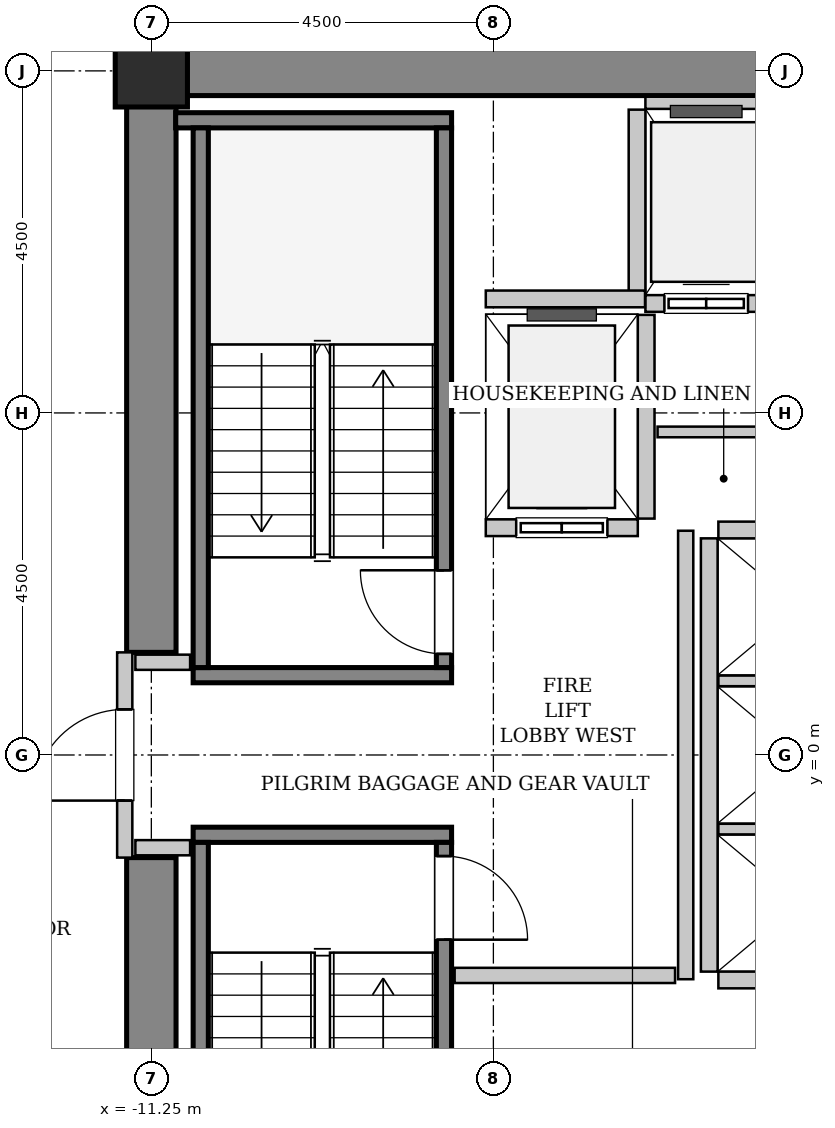
"""IFC4 building model, lengths in metres.
Left out: names, types, materials, properties, quantities, classifications, styles, units other than length and angle.
Written with IfcOpenShell. Run it as: python <this file> out.ifc"""

import sys

from ifc_helpers import new_model, si_unit, direction, frame, frame_2d, origin, origin_2d, place, context, subcontext, project, spatial, rectangle, hollow_rectangle, extrude, source, transform, mapped, element, fill, save


model = new_model("IFC4")
c1 = context("Model", 3, precision=1e-05, world=origin(), true_north=direction((0.0, 1.0)))
c2 = subcontext(c1, "Body", "Model", "MODEL_VIEW")
j1 = project(units=[si_unit("LENGTHUNIT", "METRE"), si_unit("PLANEANGLEUNIT", "RADIAN")], contexts=[c1])
p1 = place(None, origin())
s1 = spatial("IfcSite", under=j1, at=p1, CompositionType="ELEMENT")
p2 = place(p1, origin())
s2 = spatial("IfcBuilding", under=s1, at=p2, CompositionType="ELEMENT")
p3 = place(p2, frame((0.0, 0.0, 33.0)))
s3 = spatial("IfcBuildingStorey", under=s2, at=p3, CompositionType="ELEMENT", Elevation=33.0)
m1 = source(origin(), c2, "Body", "SweptSolid", [
    extrude(rectangle(XDim=10.025, YDim=0.65, at=frame_2d((5.012, 0.0))), origin(), (0.0, 0.0, 1.0), 3.8),
])
p4 = place(p3, frame((-11.575, 9.0, 0.0), z_axis=(0.0, 0.0, 1.0), x_axis=(1.0, 0.0, 0.0)))
e1 = element("IfcWall", 1, at=p4, inside=s3, PredefinedType="SHEAR", context=c2, shape_type="MappedRepresentation", body=[
    mapped(m1, transform((0.0, 0.0, 0.0), x_axis=(1.0, 0.0, 0.0), y_axis=(0.0, 1.0, 0.0), z_axis=(0.0, 0.0, 1.0), scale=1.0)),
])
m2 = source(origin(), c2, "Body", "SweptSolid", [
    extrude(rectangle(XDim=7.325, YDim=0.65, at=frame_2d((3.663, 0.0))), origin(), (0.0, 0.0, 1.0), 3.8),
])
for number, where, z_axis, x_axis in (
    (2, (-11.25, -8.675, 0.0), (0.0, 0.0, 1.0), (0.0, 1.0, 0.0)),
    (3, (-11.25, 1.35, 0.0), (0.0, 0.0, 1.0), (0.0, 1.0, 0.0)),
):
    element("IfcWall", number, at=place(p3, frame(where, z_axis=z_axis, x_axis=x_axis)), inside=s3, PredefinedType="SHEAR", context=c2, shape_type="MappedRepresentation", body=[
        mapped(m2, transform((0.0, 0.0, 0.0), x_axis=(1.0, 0.0, 0.0), y_axis=(0.0, 1.0, 0.0), z_axis=(0.0, 0.0, 1.0), scale=1.0)),
    ])
m3 = source(origin(), c2, "Body", "SweptSolid", [
    extrude(hollow_rectangle(XDim=0.95, YDim=0.95, WallThickness=0.045, InnerFilletRadius=0.045, OuterFilletRadius=0.09, at=origin_2d()), origin(), (0.0, 0.0, 1.0), 3.8),
])
p5 = place(p3, frame((-11.25, 9.0, 0.0), z_axis=(0.0, 0.0, 1.0), x_axis=(1.0, 0.0, 0.0)))
e4 = element("IfcColumn", 4, at=p5, inside=s3, PredefinedType="COLUMN", context=c2, shape_type="MappedRepresentation", body=[
    mapped(m3, transform((0.0, 0.0, 0.0), x_axis=(1.0, 0.0, 0.0), y_axis=(0.0, 1.0, 0.0), z_axis=(0.0, 0.0, 1.0), scale=1.0)),
])
m4 = source(origin(), c2, "Body", "SweptSolid", [
    extrude(rectangle(XDim=3.4, YDim=0.2, at=frame_2d((1.7, 0.0))), origin(), (0.0, 0.0, 1.0), 3.8),
])
p6 = place(p3, frame((-7.3, 1.05, 0.0), z_axis=(0.0, 0.0, 1.0), x_axis=(-1.0, 0.0, 0.0)))
e5 = element("IfcWall", 5, at=p6, inside=s3, PredefinedType="SOLIDWALL", context=c2, shape_type="MappedRepresentation", body=[
    mapped(m4, transform((0.0, 0.0, 0.0), x_axis=(1.0, 0.0, 0.0), y_axis=(0.0, 1.0, 0.0), z_axis=(0.0, 0.0, 1.0), scale=1.0)),
])
m5 = source(origin(), c2, "Body", "SweptSolid", [
    extrude(rectangle(XDim=3.63, YDim=0.2, at=frame_2d((1.815, 0.0))), origin(), (0.0, 0.0, 1.0), 3.8),
])
p7 = place(p3, frame((-7.3, 8.35, 0.0), z_axis=(0.0, 0.0, 1.0), x_axis=(-1.0, 0.0, 0.0)))
e6 = element("IfcWall", 6, at=p7, inside=s3, PredefinedType="SOLIDWALL", context=c2, shape_type="MappedRepresentation", body=[
    mapped(m5, transform((0.0, 0.0, 0.0), x_axis=(1.0, 0.0, 0.0), y_axis=(0.0, 1.0, 0.0), z_axis=(0.0, 0.0, 1.0), scale=1.0)),
])
m6 = source(origin(), c2, "Body", "SweptSolid", [
    extrude(rectangle(XDim=7.1, YDim=0.2, at=frame_2d((3.55, 0.0))), origin(), (0.0, 0.0, 1.0), 3.8),
])
p8 = place(p3, frame((-7.4, 1.15, 0.0), z_axis=(0.0, 0.0, 1.0), x_axis=(0.0, 1.0, 0.0)))
e7 = element("IfcWall", 7, at=p8, inside=s3, PredefinedType="SOLIDWALL", context=c2, shape_type="MappedRepresentation", body=[
    mapped(m6, transform((0.0, 0.0, 0.0), x_axis=(1.0, 0.0, 0.0), y_axis=(0.0, 1.0, 0.0), z_axis=(0.0, 0.0, 1.0), scale=1.0)),
])
p9 = place(p8, frame((0.18, 0.0, 0.0)))
e8 = element("IfcOpeningElement", 8, at=p9, cuts=e7, PredefinedType="OPENING", context=c2, shape_type="SweptSolid", body=[
    extrude(rectangle(XDim=1.1, YDim=2.15, at=frame_2d((0.55, 1.075))), frame((0.0, 0.11, 0.0), z_axis=(0.0, -1.0, 0.0), x_axis=(1.0, 0.0, 0.0)), (0.0, 0.0, 1.0), 0.22),
])
p10 = place(p3, frame((-10.6, 1.15, 0.0), z_axis=(0.0, 0.0, 1.0), x_axis=(0.0, 1.0, 0.0)))
e9 = element("IfcWall", 9, at=p10, inside=s3, PredefinedType="SOLIDWALL", context=c2, shape_type="MappedRepresentation", body=[
    mapped(m6, transform((0.0, 0.0, 0.0), x_axis=(1.0, 0.0, 0.0), y_axis=(0.0, 1.0, 0.0), z_axis=(0.0, 0.0, 1.0), scale=1.0)),
])
p11 = place(p3, frame((-10.7, -1.05, 0.0), z_axis=(0.0, 0.0, 1.0), x_axis=(1.0, 0.0, 0.0)))
e10 = element("IfcWall", 10, at=p11, inside=s3, PredefinedType="SOLIDWALL", context=c2, shape_type="MappedRepresentation", body=[
    mapped(m4, transform((0.0, 0.0, 0.0), x_axis=(1.0, 0.0, 0.0), y_axis=(0.0, 1.0, 0.0), z_axis=(0.0, 0.0, 1.0), scale=1.0)),
])
p12 = place(p3, frame((-10.6, -1.15, 0.0), z_axis=(0.0, 0.0, 1.0), x_axis=(0.0, -1.0, 0.0)))
e11 = element("IfcWall", 11, at=p12, inside=s3, PredefinedType="SOLIDWALL", context=c2, shape_type="MappedRepresentation", body=[
    mapped(m6, transform((0.0, 0.0, 0.0), x_axis=(1.0, 0.0, 0.0), y_axis=(0.0, 1.0, 0.0), z_axis=(0.0, 0.0, 1.0), scale=1.0)),
])
p13 = place(p3, frame((-7.4, -1.15, 0.0), z_axis=(0.0, 0.0, 1.0), x_axis=(0.0, -1.0, 0.0)))
e12 = element("IfcWall", 12, at=p13, inside=s3, PredefinedType="SOLIDWALL", context=c2, shape_type="MappedRepresentation", body=[
    mapped(m6, transform((0.0, 0.0, 0.0), x_axis=(1.0, 0.0, 0.0), y_axis=(0.0, 1.0, 0.0), z_axis=(0.0, 0.0, 1.0), scale=1.0)),
])
p14 = place(p13, frame((0.18, 0.0, 0.0)))
e13 = element("IfcOpeningElement", 13, at=p14, cuts=e12, PredefinedType="OPENING", context=c2, shape_type="SweptSolid", body=[
    extrude(rectangle(XDim=1.1, YDim=2.15, at=frame_2d((0.55, 1.075))), frame((0.0, 0.11, 0.0), z_axis=(0.0, -1.0, 0.0), x_axis=(1.0, 0.0, 0.0)), (0.0, 0.0, 1.0), 0.22),
])
m7 = source(origin(), c2, "Body", "SweptSolid", [
    extrude(rectangle(XDim=2.0, YDim=0.22, at=frame_2d((1.0, 0.0))), origin(), (0.0, 0.0, 1.0), 3.535),
])
p15 = place(p3, frame((-6.85, 2.99, 0.0), z_axis=(0.0, 0.0, 1.0), x_axis=(1.0, 0.0, 0.0)))
e14 = element("IfcWall", 14, at=p15, inside=s3, PredefinedType="SOLIDWALL", context=c2, shape_type="MappedRepresentation", body=[
    mapped(m7, transform((0.0, 0.0, 0.0), x_axis=(1.0, 0.0, 0.0), y_axis=(0.0, 1.0, 0.0), z_axis=(0.0, 0.0, 1.0), scale=1.0)),
])
p16 = place(p15, frame((0.4, 0.0, 0.0)))
e15 = element("IfcOpeningElement", 15, at=p16, cuts=e14, PredefinedType="OPENING", context=c2, shape_type="SweptSolid", body=[
    extrude(rectangle(XDim=1.2, YDim=2.2, at=frame_2d((0.6, 1.1))), frame((0.0, 0.12, 0.0), z_axis=(0.0, -1.0, 0.0), x_axis=(1.0, 0.0, 0.0)), (0.0, 0.0, 1.0), 0.24),
])
m8 = source(origin(), c2, "Body", "SweptSolid", [
    extrude(rectangle(XDim=2.68, YDim=0.22, at=frame_2d((1.34, 0.0))), origin(), (0.0, 0.0, 1.0), 3.535),
])
p17 = place(p3, frame((-4.74, 3.11, 0.0), z_axis=(0.0, 0.0, 1.0), x_axis=(0.0, 1.0, 0.0)))
e16 = element("IfcWall", 16, at=p17, inside=s3, PredefinedType="SOLIDWALL", context=c2, shape_type="MappedRepresentation", body=[
    mapped(m8, transform((0.0, 0.0, 0.0), x_axis=(1.0, 0.0, 0.0), y_axis=(0.0, 1.0, 0.0), z_axis=(0.0, 0.0, 1.0), scale=1.0)),
])
m9 = source(origin(), c2, "Body", "SweptSolid", [
    extrude(rectangle(XDim=3.2, YDim=0.22, at=frame_2d((1.6, 0.0))), origin(), (0.0, 0.0, 1.0), 3.535),
])
p18 = place(p3, frame((-4.75, 5.94, 0.0), z_axis=(0.0, 0.0, 1.0), x_axis=(1.0, 0.0, 0.0)))
e17 = element("IfcWall", 17, at=p18, inside=s3, PredefinedType="SOLIDWALL", context=c2, shape_type="MappedRepresentation", body=[
    mapped(m9, transform((0.0, 0.0, 0.0), x_axis=(1.0, 0.0, 0.0), y_axis=(0.0, 1.0, 0.0), z_axis=(0.0, 0.0, 1.0), scale=1.0)),
])
p19 = place(p18, frame((0.25, 0.0, 0.0)))
e18 = element("IfcOpeningElement", 18, at=p19, cuts=e17, PredefinedType="OPENING", context=c2, shape_type="SweptSolid", body=[
    extrude(rectangle(XDim=1.1, YDim=2.2, at=frame_2d((0.55, 1.1))), frame((0.0, 0.12, 0.0), z_axis=(0.0, -1.0, 0.0), x_axis=(1.0, 0.0, 0.0)), (0.0, 0.0, 1.0), 0.24),
])
p20 = place(p18, frame((1.875, 0.0, 0.0)))
e19 = element("IfcOpeningElement", 19, at=p20, cuts=e17, PredefinedType="OPENING", context=c2, shape_type="SweptSolid", body=[
    extrude(rectangle(XDim=1.1, YDim=2.2, at=frame_2d((0.55, 1.1))), frame((0.0, 0.12, 0.0), z_axis=(0.0, -1.0, 0.0), x_axis=(1.0, 0.0, 0.0)), (0.0, 0.0, 1.0), 0.24),
])
m10 = source(origin(), c2, "Body", "SweptSolid", [
    extrude(rectangle(XDim=3.2, YDim=0.16, at=frame_2d((1.6, 0.0))), origin(), (0.0, 0.0, 1.0), 2.425),
])
p21 = place(p3, frame((-1.55, 8.58, 0.0), z_axis=(0.0, 0.0, 1.0), x_axis=(-1.0, 0.0, 0.0)))
e20 = element("IfcWall", 20, at=p21, inside=s3, PredefinedType="PARTITIONING", context=c2, shape_type="MappedRepresentation", body=[
    mapped(m10, transform((0.0, 0.0, 0.0), x_axis=(1.0, 0.0, 0.0), y_axis=(0.0, 1.0, 0.0), z_axis=(0.0, 0.0, 1.0), scale=1.0)),
])
m11 = source(origin(), c2, "Body", "SweptSolid", [
    extrude(rectangle(XDim=2.43, YDim=0.22, at=frame_2d((1.215, 0.0))), origin(), (0.0, 0.0, 1.0), 3.535),
])
p22 = place(p3, frame((-4.86, 8.49, 0.0), z_axis=(0.0, 0.0, 1.0), x_axis=(0.0, -1.0, 0.0)))
e21 = element("IfcWall", 21, at=p22, inside=s3, PredefinedType="SOLIDWALL", context=c2, shape_type="MappedRepresentation", body=[
    mapped(m11, transform((0.0, 0.0, 0.0), x_axis=(1.0, 0.0, 0.0), y_axis=(0.0, 1.0, 0.0), z_axis=(0.0, 0.0, 1.0), scale=1.0)),
])
m12 = source(origin(), c2, "Body", "SweptSolid", [
    extrude(rectangle(XDim=5.7, YDim=0.22, at=frame_2d((2.85, 0.0))), origin(), (0.0, 0.0, 1.0), 3.535),
])
p23 = place(p3, frame((-3.91, 2.85, 0.0), z_axis=(0.0, 0.0, 1.0), x_axis=(0.0, -1.0, 0.0)))
e22 = element("IfcWall", 22, at=p23, inside=s3, PredefinedType="SOLIDWALL", context=c2, shape_type="MappedRepresentation", body=[
    mapped(m12, transform((0.0, 0.0, 0.0), x_axis=(1.0, 0.0, 0.0), y_axis=(0.0, 1.0, 0.0), z_axis=(0.0, 0.0, 1.0), scale=1.0)),
])
m13 = source(origin(), c2, "Body", "SweptSolid", [
    extrude(rectangle(XDim=2.13, YDim=0.22, at=frame_2d((1.065, 0.0))), origin(), (0.0, 0.0, 1.0), 3.535),
])
p24 = place(p3, frame((-3.79, -2.96, 0.0), z_axis=(0.0, 0.0, 1.0), x_axis=(1.0, 0.0, 0.0)))
e23 = element("IfcWall", 23, at=p24, inside=s3, PredefinedType="SOLIDWALL", context=c2, shape_type="MappedRepresentation", body=[
    mapped(m13, transform((0.0, 0.0, 0.0), x_axis=(1.0, 0.0, 0.0), y_axis=(0.0, 1.0, 0.0), z_axis=(0.0, 0.0, 1.0), scale=1.0)),
])
m14 = source(origin(), c2, "Body", "SweptSolid", [
    extrude(rectangle(XDim=2.13, YDim=0.14, at=frame_2d((1.065, 0.0))), origin(), (0.0, 0.0, 1.0), 3.535),
])
for number, where, z_axis, x_axis in (
    (24, (-3.79, -0.975, 0.0), (0.0, 0.0, 1.0), (1.0, 0.0, 0.0)),
    (25, (-3.79, 0.975, 0.0), (0.0, 0.0, 1.0), (1.0, 0.0, 0.0)),
):
    element("IfcWall", number, at=place(p3, frame(where, z_axis=z_axis, x_axis=x_axis)), inside=s3, PredefinedType="PARTITIONING", context=c2, shape_type="MappedRepresentation", body=[
        mapped(m14, transform((0.0, 0.0, 0.0), x_axis=(1.0, 0.0, 0.0), y_axis=(0.0, 1.0, 0.0), z_axis=(0.0, 0.0, 1.0), scale=1.0)),
    ])
p25 = place(p3, frame((-1.66, 2.96, 0.0), z_axis=(0.0, 0.0, 1.0), x_axis=(-1.0, 0.0, 0.0)))
e26 = element("IfcWall", 26, at=p25, inside=s3, PredefinedType="SOLIDWALL", context=c2, shape_type="MappedRepresentation", body=[
    mapped(m13, transform((0.0, 0.0, 0.0), x_axis=(1.0, 0.0, 0.0), y_axis=(0.0, 1.0, 0.0), z_axis=(0.0, 0.0, 1.0), scale=1.0)),
])
m15 = source(origin(), c2, "Body", "SweptSolid", [
    extrude(rectangle(XDim=2.095, YDim=0.22, at=frame_2d((1.048, 0.0))), origin(), (0.0, 0.0, 1.0), 3.535),
])
p26 = place(p3, frame((-6.85, 6.0, 0.0), z_axis=(0.0, 0.0, 1.0), x_axis=(1.0, 0.0, 0.0)))
e27 = element("IfcWall", 27, at=p26, inside=s3, PredefinedType="SOLIDWALL", context=c2, shape_type="MappedRepresentation", body=[
    mapped(m15, transform((0.0, 0.0, 0.0), x_axis=(1.0, 0.0, 0.0), y_axis=(0.0, 1.0, 0.0), z_axis=(0.0, 0.0, 1.0), scale=1.0)),
])
m16 = source(origin(), c2, "Body", "SweptSolid", [
    extrude(rectangle(XDim=2.7, YDim=0.2, at=frame_2d((1.35, 0.0))), origin(), (0.0, 0.0, 1.0), 2.425),
])
p27 = place(p3, frame((-11.6, -1.35, 0.0), z_axis=(0.0, 0.0, 1.0), x_axis=(0.0, 1.0, 0.0)))
e28 = element("IfcWall", 28, at=p27, inside=s3, PredefinedType="PARTITIONING", context=c2, shape_type="MappedRepresentation", body=[
    mapped(m16, transform((0.0, 0.0, 0.0), x_axis=(1.0, 0.0, 0.0), y_axis=(0.0, 1.0, 0.0), z_axis=(0.0, 0.0, 1.0), scale=1.0)),
])
p28 = place(p27, frame((0.75, 0.0, 0.0)))
e29 = element("IfcOpeningElement", 29, at=p28, cuts=e28, PredefinedType="OPENING", context=c2, shape_type="SweptSolid", body=[
    extrude(rectangle(XDim=1.2, YDim=2.15, at=frame_2d((0.6, 1.075))), frame((0.0, 0.11, 0.0), z_axis=(0.0, -1.0, 0.0), x_axis=(1.0, 0.0, 0.0)), (0.0, 0.0, 1.0), 0.22),
])
m17 = source(origin(), c2, "Body", "SweptSolid", [
    extrude(rectangle(XDim=5.9, YDim=0.2, at=frame_2d((2.95, 0.0))), origin(), (0.0, 0.0, 1.0), 3.535),
])
p29 = place(p3, frame((-4.22, -2.95, 0.0), z_axis=(0.0, 0.0, 1.0), x_axis=(0.0, 1.0, 0.0)))
e30 = element("IfcWall", 30, at=p29, inside=s3, PredefinedType="PARTITIONING", context=c2, shape_type="MappedRepresentation", body=[
    mapped(m17, transform((0.0, 0.0, 0.0), x_axis=(1.0, 0.0, 0.0), y_axis=(0.0, 1.0, 0.0), z_axis=(0.0, 0.0, 1.0), scale=1.0)),
])
m18 = source(origin(), c2, "Body", "SweptSolid", [
    extrude(rectangle(XDim=2.9, YDim=0.2, at=frame_2d((1.45, 0.0))), origin(), (0.0, 0.0, 1.0), 3.535),
])
p30 = place(p3, frame((-7.26, -2.9, 0.0), z_axis=(0.0, 0.0, 1.0), x_axis=(1.0, 0.0, 0.0)))
e31 = element("IfcWall", 31, at=p30, inside=s3, PredefinedType="PARTITIONING", context=c2, shape_type="MappedRepresentation", body=[
    mapped(m18, transform((0.0, 0.0, 0.0), x_axis=(1.0, 0.0, 0.0), y_axis=(0.0, 1.0, 0.0), z_axis=(0.0, 0.0, 1.0), scale=1.0)),
])
m19 = source(origin(), c2, "Body", "SweptSolid", [
    extrude(rectangle(XDim=0.72, YDim=0.2, at=frame_2d((0.36, 0.0))), origin(), (0.0, 0.0, 1.0), 3.535),
])
for number, where, z_axis, x_axis in (
    (32, (-11.46, 1.22, 0.0), (0.0, 0.0, 1.0), (1.0, 0.0, 0.0)),
    (33, (-11.46, -1.22, 0.0), (0.0, 0.0, 1.0), (1.0, 0.0, 0.0)),
):
    element("IfcWall", number, at=place(p3, frame(where, z_axis=z_axis, x_axis=x_axis)), inside=s3, PredefinedType="PARTITIONING", context=c2, shape_type="MappedRepresentation", body=[
        mapped(m19, transform((0.0, 0.0, 0.0), x_axis=(1.0, 0.0, 0.0), y_axis=(0.0, 1.0, 0.0), z_axis=(0.0, 0.0, 1.0), scale=1.0)),
    ])
m20 = source(origin(), c2, "Body", "SweptSolid", [
    extrude(rectangle(XDim=2.95, YDim=0.14, at=frame_2d((1.475, 0.0))), origin(), (0.0, 0.0, 1.0), 3.535),
])
p31 = place(p3, frame((-4.59, 4.25, 0.0), z_axis=(0.0, 0.0, 1.0), x_axis=(1.0, 0.0, 0.0)))
e34 = element("IfcWall", 34, at=p31, inside=s3, PredefinedType="PARTITIONING", context=c2, shape_type="MappedRepresentation", body=[
    mapped(m20, transform((0.0, 0.0, 0.0), x_axis=(1.0, 0.0, 0.0), y_axis=(0.0, 1.0, 0.0), z_axis=(0.0, 0.0, 1.0), scale=1.0)),
])
m21 = source(origin(), c2, "Body", "SweptSolid", [
    extrude(rectangle(XDim=1.1, YDim=2.15, at=frame_2d((0.55, 1.075))), frame((0.0, 0.025, 0.0), z_axis=(0.0, -1.0, 0.0), x_axis=(1.0, 0.0, 0.0)), (0.0, 0.0, 1.0), 0.05),
])
p32 = place(p9, origin())
e35 = element("IfcDoor", 35, at=p32, inside=s3, OperationType="SINGLE_SWING_RIGHT", PredefinedType="DOOR", context=c2, shape_type="MappedRepresentation", body=[
    mapped(m21, transform((0.0, 0.0, 0.0), x_axis=(1.0, 0.0, 0.0), y_axis=(0.0, 1.0, 0.0), z_axis=(0.0, 0.0, 1.0), scale=1.0)),
])
fill(e8, e35)
p33 = place(p14, origin())
e36 = element("IfcDoor", 36, at=p33, inside=s3, OperationType="SINGLE_SWING_RIGHT", PredefinedType="DOOR", context=c2, shape_type="MappedRepresentation", body=[
    mapped(m21, transform((0.0, 0.0, 0.0), x_axis=(1.0, 0.0, 0.0), y_axis=(0.0, 1.0, 0.0), z_axis=(0.0, 0.0, 1.0), scale=1.0)),
])
fill(e13, e36)
m22 = source(origin(), c2, "Body", "SweptSolid", [
    extrude(rectangle(XDim=1.2, YDim=2.2, at=frame_2d((0.6, 1.1))), frame((0.0, 0.025, 0.0), z_axis=(0.0, -1.0, 0.0), x_axis=(1.0, 0.0, 0.0)), (0.0, 0.0, 1.0), 0.05),
])
p34 = place(p16, origin())
e37 = element("IfcDoor", 37, at=p34, inside=s3, OperationType="SLIDING_TO_LEFT", PredefinedType="DOOR", context=c2, shape_type="MappedRepresentation", body=[
    mapped(m22, transform((0.0, 0.0, 0.0), x_axis=(1.0, 0.0, 0.0), y_axis=(0.0, 1.0, 0.0), z_axis=(0.0, 0.0, 1.0), scale=1.0)),
])
fill(e15, e37)
m23 = source(origin(), c2, "Body", "SweptSolid", [
    extrude(rectangle(XDim=1.1, YDim=2.2, at=frame_2d((0.55, 1.1))), frame((0.0, 0.025, 0.0), z_axis=(0.0, -1.0, 0.0), x_axis=(1.0, 0.0, 0.0)), (0.0, 0.0, 1.0), 0.05),
])
p35 = place(p19, origin())
e38 = element("IfcDoor", 38, at=p35, inside=s3, OperationType="DOUBLE_DOOR_SLIDING", PredefinedType="DOOR", context=c2, shape_type="MappedRepresentation", body=[
    mapped(m23, transform((0.0, 0.0, 0.0), x_axis=(1.0, 0.0, 0.0), y_axis=(0.0, 1.0, 0.0), z_axis=(0.0, 0.0, 1.0), scale=1.0)),
])
fill(e18, e38)
m24 = source(origin(), c2, "Body", "SweptSolid", [
    extrude(rectangle(XDim=1.2, YDim=2.15, at=frame_2d((0.6, 1.075))), frame((0.0, 0.025, 0.0), z_axis=(0.0, -1.0, 0.0), x_axis=(1.0, 0.0, 0.0)), (0.0, 0.0, 1.0), 0.05),
])
p36 = place(p28, origin())
e39 = element("IfcDoor", 39, at=p36, inside=s3, OperationType="SINGLE_SWING_LEFT", PredefinedType="DOOR", context=c2, shape_type="MappedRepresentation", body=[
    mapped(m24, transform((0.0, 0.0, 0.0), x_axis=(1.0, 0.0, 0.0), y_axis=(0.0, 1.0, 0.0), z_axis=(0.0, 0.0, 1.0), scale=1.0)),
])
fill(e29, e39)
save(model, sys.argv[1])
